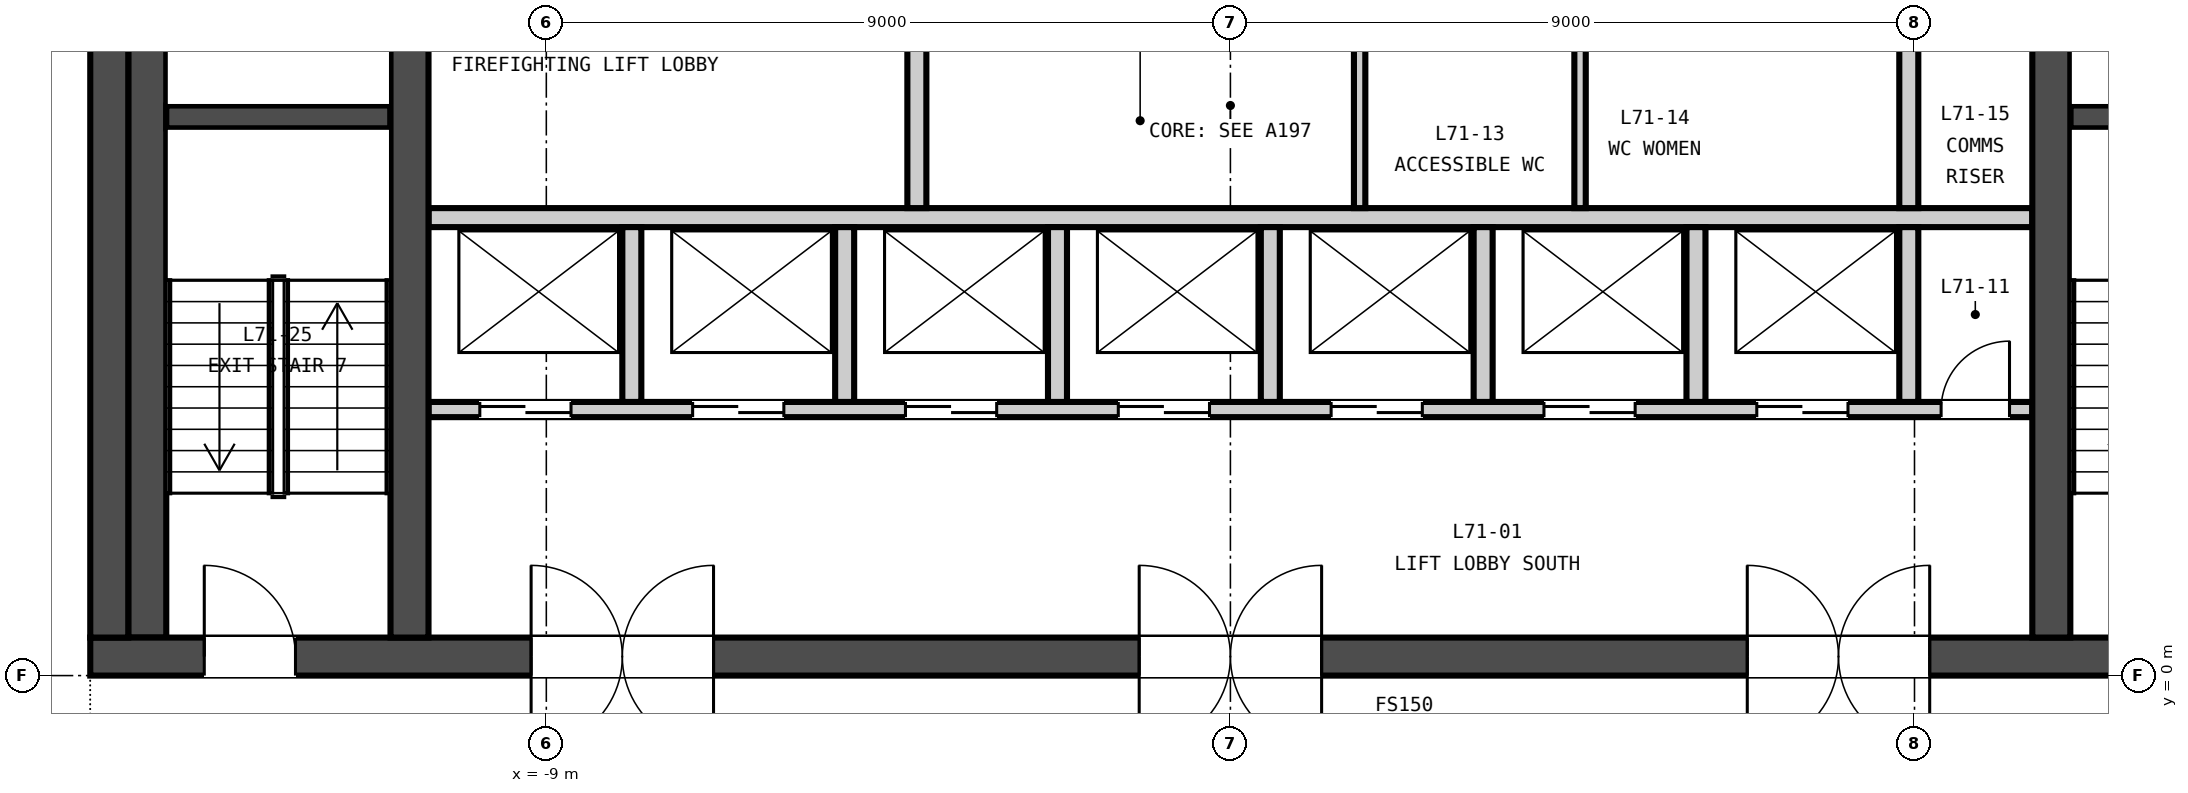
"""IFC4 building model, lengths in metres.
Left out: names, types, materials, properties, quantities, classifications, styles, units other than length and angle.
Written with IfcOpenShell. Run it as: python <this file> out.ifc"""

import sys

from ifc_helpers import new_model, si_unit, direction, frame, frame_2d, origin, place, context, subcontext, project, spatial, rectangle, extrude, element, fill, save


model = new_model("IFC4")
c1 = context("Model", 3, precision=1e-05, world=origin(), true_north=direction((0.0, 1.0)))
c2 = subcontext(c1, "Body", "Model", "MODEL_VIEW")
j1 = project(units=[si_unit("LENGTHUNIT", "METRE"), si_unit("PLANEANGLEUNIT", "RADIAN")], contexts=[c1])
p1 = place(None, origin())
s1 = spatial("IfcSite", under=j1, at=p1, CompositionType="ELEMENT")
p2 = place(p1, origin())
s2 = spatial("IfcBuilding", under=s1, at=p2, CompositionType="ELEMENT")
p3 = place(p2, frame((0.0, 0.0, 279.2)))
s3 = spatial("IfcBuildingStorey", under=s2, at=p3, CompositionType="ELEMENT", Elevation=279.2)
p4 = place(p3, frame((-15.0, 0.25, -0.15), z_axis=(0.0, 0.0, 1.0), x_axis=(1.0, 0.0, 0.0)))
e1 = element("IfcWall", 1, at=p4, inside=s3, PredefinedType="SOLIDWALL", context=c2, shape_type="SweptSolid", body=[
    extrude(rectangle(XDim=30.0, YDim=0.5, at=frame_2d((15.0, 0.0))), origin(), (0.0, 0.0, 1.0), 3.65),
])
p5 = place(p4, frame((5.8, 0.0, 0.15)))
e2 = element("IfcOpeningElement", 2, at=p5, cuts=e1, PredefinedType="OPENING", context=c2, shape_type="SweptSolid", body=[
    extrude(rectangle(XDim=2.4, YDim=2.4, at=frame_2d((1.2, 1.2))), frame((0.0, 0.26, 0.0), z_axis=(0.0, -1.0, 0.0), x_axis=(1.0, 0.0, 0.0)), (0.0, 0.0, 1.0), 0.52),
])
p6 = place(p4, frame((13.8, 0.0, 0.15)))
e3 = element("IfcOpeningElement", 3, at=p6, cuts=e1, PredefinedType="OPENING", context=c2, shape_type="SweptSolid", body=[
    extrude(rectangle(XDim=2.4, YDim=2.4, at=frame_2d((1.2, 1.2))), frame((0.0, 0.26, 0.0), z_axis=(0.0, -1.0, 0.0), x_axis=(1.0, 0.0, 0.0)), (0.0, 0.0, 1.0), 0.52),
])
p7 = place(p4, frame((21.8, 0.0, 0.15)))
e4 = element("IfcOpeningElement", 4, at=p7, cuts=e1, PredefinedType="OPENING", context=c2, shape_type="SweptSolid", body=[
    extrude(rectangle(XDim=2.4, YDim=2.4, at=frame_2d((1.2, 1.2))), frame((0.0, 0.26, 0.0), z_axis=(0.0, -1.0, 0.0), x_axis=(1.0, 0.0, 0.0)), (0.0, 0.0, 1.0), 0.52),
])
p8 = place(p4, frame((1.5, 0.0, 0.15)))
e5 = element("IfcOpeningElement", 5, at=p8, cuts=e1, PredefinedType="OPENING", context=c2, shape_type="SweptSolid", body=[
    extrude(rectangle(XDim=1.2, YDim=2.1, at=frame_2d((0.6, 1.05))), frame((0.0, 0.26, 0.0), z_axis=(0.0, -1.0, 0.0), x_axis=(1.0, 0.0, 0.0)), (0.0, 0.0, 1.0), 0.52),
])
p9 = place(p4, frame((27.3, 0.0, 0.15)))
e6 = element("IfcOpeningElement", 6, at=p9, cuts=e1, PredefinedType="OPENING", context=c2, shape_type="SweptSolid", body=[
    extrude(rectangle(XDim=1.2, YDim=2.1, at=frame_2d((0.6, 1.05))), frame((0.0, 0.26, 0.0), z_axis=(0.0, -1.0, 0.0), x_axis=(1.0, 0.0, 0.0)), (0.0, 0.0, 1.0), 0.52),
])
for number, where, z_axis, x_axis in (
    (7, (-14.75, 0.5, -0.15), (0.0, 0.0, 1.0), (0.0, 1.0, 0.0)),
    (8, (-10.8, 0.5, -0.15), (0.0, 0.0, 1.0), (0.0, 1.0, 0.0)),
    (9, (10.8, 0.5, -0.15), (0.0, 0.0, 1.0), (0.0, 1.0, 0.0)),
):
    element("IfcWall", number, at=place(p3, frame(where, z_axis=z_axis, x_axis=x_axis)), inside=s3, PredefinedType="SOLIDWALL", context=c2, shape_type="SweptSolid", body=[
        extrude(rectangle(XDim=14.0, YDim=0.5, at=frame_2d((7.0, 0.0))), origin(), (0.0, 0.0, 1.0), 3.65),
    ])
p10 = place(p3, frame((-10.55, 3.5, 0.0), z_axis=(0.0, 0.0, 1.0), x_axis=(1.0, 0.0, 0.0)))
e10 = element("IfcWall", 10, at=p10, inside=s3, PredefinedType="PARTITIONING", context=c2, shape_type="SweptSolid", body=[
    extrude(rectangle(XDim=21.1, YDim=0.2, at=frame_2d((10.55, 0.0))), origin(), (0.0, 0.0, 1.0), 3.5),
])
p11 = place(p10, frame((0.675, 0.0, 0.0)))
e11 = element("IfcOpeningElement", 11, at=p11, cuts=e10, PredefinedType="OPENING", context=c2, shape_type="SweptSolid", body=[
    extrude(rectangle(XDim=1.2, YDim=2.1, at=frame_2d((0.6, 1.05))), frame((0.0, 0.11, 0.0), z_axis=(0.0, -1.0, 0.0), x_axis=(1.0, 0.0, 0.0)), (0.0, 0.0, 1.0), 0.22),
])
p12 = place(p10, frame((3.475, 0.0, 0.0)))
e12 = element("IfcOpeningElement", 12, at=p12, cuts=e10, PredefinedType="OPENING", context=c2, shape_type="SweptSolid", body=[
    extrude(rectangle(XDim=1.2, YDim=2.1, at=frame_2d((0.6, 1.05))), frame((0.0, 0.11, 0.0), z_axis=(0.0, -1.0, 0.0), x_axis=(1.0, 0.0, 0.0)), (0.0, 0.0, 1.0), 0.22),
])
p13 = place(p10, frame((6.275, 0.0, 0.0)))
e13 = element("IfcOpeningElement", 13, at=p13, cuts=e10, PredefinedType="OPENING", context=c2, shape_type="SweptSolid", body=[
    extrude(rectangle(XDim=1.2, YDim=2.1, at=frame_2d((0.6, 1.05))), frame((0.0, 0.11, 0.0), z_axis=(0.0, -1.0, 0.0), x_axis=(1.0, 0.0, 0.0)), (0.0, 0.0, 1.0), 0.22),
])
p14 = place(p10, frame((9.075, 0.0, 0.0)))
e14 = element("IfcOpeningElement", 14, at=p14, cuts=e10, PredefinedType="OPENING", context=c2, shape_type="SweptSolid", body=[
    extrude(rectangle(XDim=1.2, YDim=2.1, at=frame_2d((0.6, 1.05))), frame((0.0, 0.11, 0.0), z_axis=(0.0, -1.0, 0.0), x_axis=(1.0, 0.0, 0.0)), (0.0, 0.0, 1.0), 0.22),
])
p15 = place(p10, frame((11.875, 0.0, 0.0)))
e15 = element("IfcOpeningElement", 15, at=p15, cuts=e10, PredefinedType="OPENING", context=c2, shape_type="SweptSolid", body=[
    extrude(rectangle(XDim=1.2, YDim=2.1, at=frame_2d((0.6, 1.05))), frame((0.0, 0.11, 0.0), z_axis=(0.0, -1.0, 0.0), x_axis=(1.0, 0.0, 0.0)), (0.0, 0.0, 1.0), 0.22),
])
p16 = place(p10, frame((14.675, 0.0, 0.0)))
e16 = element("IfcOpeningElement", 16, at=p16, cuts=e10, PredefinedType="OPENING", context=c2, shape_type="SweptSolid", body=[
    extrude(rectangle(XDim=1.2, YDim=2.1, at=frame_2d((0.6, 1.05))), frame((0.0, 0.11, 0.0), z_axis=(0.0, -1.0, 0.0), x_axis=(1.0, 0.0, 0.0)), (0.0, 0.0, 1.0), 0.22),
])
p17 = place(p10, frame((17.475, 0.0, 0.0)))
e17 = element("IfcOpeningElement", 17, at=p17, cuts=e10, PredefinedType="OPENING", context=c2, shape_type="SweptSolid", body=[
    extrude(rectangle(XDim=1.2, YDim=2.1, at=frame_2d((0.6, 1.05))), frame((0.0, 0.11, 0.0), z_axis=(0.0, -1.0, 0.0), x_axis=(1.0, 0.0, 0.0)), (0.0, 0.0, 1.0), 0.22),
])
p18 = place(p10, frame((19.9, 0.0, 0.0)))
e18 = element("IfcOpeningElement", 18, at=p18, cuts=e10, PredefinedType="OPENING", context=c2, shape_type="SweptSolid", body=[
    extrude(rectangle(XDim=0.9, YDim=2.1, at=frame_2d((0.45, 1.05))), frame((0.0, 0.11, 0.0), z_axis=(0.0, -1.0, 0.0), x_axis=(1.0, 0.0, 0.0)), (0.0, 0.0, 1.0), 0.22),
])
p19 = place(p3, frame((-10.55, 6.025, 0.0), z_axis=(0.0, 0.0, 1.0), x_axis=(1.0, 0.0, 0.0)))
e19 = element("IfcWall", 19, at=p19, inside=s3, PredefinedType="PARTITIONING", context=c2, shape_type="SweptSolid", body=[
    extrude(rectangle(XDim=21.1, YDim=0.25, at=frame_2d((10.55, 0.0))), origin(), (0.0, 0.0, 1.0), 3.5),
])
p20 = place(p3, frame((-4.125, 6.15, 0.0), z_axis=(0.0, 0.0, 1.0), x_axis=(0.0, 1.0, 0.0)))
e20 = element("IfcWall", 20, at=p20, inside=s3, PredefinedType="PARTITIONING", context=c2, shape_type="SweptSolid", body=[
    extrude(rectangle(XDim=4.95, YDim=0.25, at=frame_2d((2.475, 0.0))), origin(), (0.0, 0.0, 1.0), 3.5),
])
p21 = place(p20, frame((3.125, 0.0, 0.0)))
e21 = element("IfcOpeningElement", 21, at=p21, cuts=e20, PredefinedType="OPENING", context=c2, shape_type="SweptSolid", body=[
    extrude(rectangle(XDim=1.2, YDim=2.1, at=frame_2d((0.6, 1.05))), frame((0.0, 0.135, 0.0), z_axis=(0.0, -1.0, 0.0), x_axis=(1.0, 0.0, 0.0)), (0.0, 0.0, 1.0), 0.27),
])
for number, where, z_axis, x_axis in (
    (22, (-7.875, 3.6, 0.0), (0.0, 0.0, 1.0), (0.0, 1.0, 0.0)),
    (23, (-5.075, 3.6, 0.0), (0.0, 0.0, 1.0), (0.0, 1.0, 0.0)),
    (24, (-2.275, 3.6, 0.0), (0.0, 0.0, 1.0), (0.0, 1.0, 0.0)),
    (25, (0.525, 3.6, 0.0), (0.0, 0.0, 1.0), (0.0, 1.0, 0.0)),
    (26, (3.325, 3.6, 0.0), (0.0, 0.0, 1.0), (0.0, 1.0, 0.0)),
    (27, (6.125, 3.6, 0.0), (0.0, 0.0, 1.0), (0.0, 1.0, 0.0)),
    (28, (8.925, 3.6, 0.0), (0.0, 0.0, 1.0), (0.0, 1.0, 0.0)),
):
    element("IfcWall", number, at=place(p3, frame(where, z_axis=z_axis, x_axis=x_axis)), inside=s3, PredefinedType="PARTITIONING", context=c2, shape_type="SweptSolid", body=[
        extrude(rectangle(XDim=2.3, YDim=0.25, at=frame_2d((1.15, 0.0))), origin(), (0.0, 0.0, 1.0), 3.5),
    ])
for number, where, z_axis, x_axis in (
    (29, (1.7, 6.15, 0.0), (0.0, 0.0, 1.0), (0.0, 1.0, 0.0)),
    (30, (4.6, 6.15, 0.0), (0.0, 0.0, 1.0), (0.0, 1.0, 0.0)),
):
    element("IfcWall", number, at=place(p3, frame(where, z_axis=z_axis, x_axis=x_axis)), inside=s3, PredefinedType="PARTITIONING", context=c2, shape_type="SweptSolid", body=[
        extrude(rectangle(XDim=2.3, YDim=0.15, at=frame_2d((1.15, 0.0))), origin(), (0.0, 0.0, 1.0), 3.5),
    ])
p22 = place(p3, frame((8.925, 6.15, 0.0), z_axis=(0.0, 0.0, 1.0), x_axis=(0.0, 1.0, 0.0)))
e31 = element("IfcWall", 31, at=p22, inside=s3, PredefinedType="PARTITIONING", context=c2, shape_type="SweptSolid", body=[
    extrude(rectangle(XDim=2.3, YDim=0.25, at=frame_2d((1.15, 0.0))), origin(), (0.0, 0.0, 1.0), 3.5),
])
p23 = place(p3, frame((-14.0, 7.35, 0.0), z_axis=(0.0, 0.0, 1.0), x_axis=(1.0, 0.0, 0.0)))
e32 = element("IfcWall", 32, at=p23, inside=s3, PredefinedType="SOLIDWALL", context=c2, shape_type="SweptSolid", body=[
    extrude(rectangle(XDim=2.95, YDim=0.3, at=frame_2d((1.475, 0.0))), origin(), (0.0, 0.0, 1.0), 3.5),
])
p24 = place(p3, frame((-14.25, 0.5, 0.0), z_axis=(0.0, 0.0, 1.0), x_axis=(0.0, 1.0, 0.0)))
e33 = element("IfcWall", 33, at=p24, inside=s3, PredefinedType="SOLIDWALL", context=c2, shape_type="SweptSolid", body=[
    extrude(rectangle(XDim=14.0, YDim=0.5, at=frame_2d((7.0, 0.0))), origin(), (0.0, 0.0, 1.0), 3.5),
])
p25 = place(p3, frame((11.05, 7.35, 0.0), z_axis=(0.0, 0.0, 1.0), x_axis=(1.0, 0.0, 0.0)))
e34 = element("IfcWall", 34, at=p25, inside=s3, PredefinedType="SOLIDWALL", context=c2, shape_type="SweptSolid", body=[
    extrude(rectangle(XDim=2.95, YDim=0.3, at=frame_2d((1.475, 0.0))), origin(), (0.0, 0.0, 1.0), 3.5),
])
p26 = place(p11, origin())
e35 = element("IfcDoor", 35, at=p26, inside=s3, OperationType="DOUBLE_DOOR_SLIDING", PredefinedType="DOOR", context=c2, shape_type="SweptSolid", body=[
    extrude(rectangle(XDim=1.2, YDim=2.1, at=frame_2d((0.6, 1.05))), frame((0.0, 0.025, 0.0), z_axis=(0.0, -1.0, 0.0), x_axis=(1.0, 0.0, 0.0)), (0.0, 0.0, 1.0), 0.05),
])
fill(e11, e35)
p27 = place(p12, origin())
e36 = element("IfcDoor", 36, at=p27, inside=s3, OperationType="DOUBLE_DOOR_SLIDING", PredefinedType="DOOR", context=c2, shape_type="SweptSolid", body=[
    extrude(rectangle(XDim=1.2, YDim=2.1, at=frame_2d((0.6, 1.05))), frame((0.0, 0.025, 0.0), z_axis=(0.0, -1.0, 0.0), x_axis=(1.0, 0.0, 0.0)), (0.0, 0.0, 1.0), 0.05),
])
fill(e12, e36)
p28 = place(p13, origin())
e37 = element("IfcDoor", 37, at=p28, inside=s3, OperationType="DOUBLE_DOOR_SLIDING", PredefinedType="DOOR", context=c2, shape_type="SweptSolid", body=[
    extrude(rectangle(XDim=1.2, YDim=2.1, at=frame_2d((0.6, 1.05))), frame((0.0, 0.025, 0.0), z_axis=(0.0, -1.0, 0.0), x_axis=(1.0, 0.0, 0.0)), (0.0, 0.0, 1.0), 0.05),
])
fill(e13, e37)
p29 = place(p14, origin())
e38 = element("IfcDoor", 38, at=p29, inside=s3, OperationType="DOUBLE_DOOR_SLIDING", PredefinedType="DOOR", context=c2, shape_type="SweptSolid", body=[
    extrude(rectangle(XDim=1.2, YDim=2.1, at=frame_2d((0.6, 1.05))), frame((0.0, 0.025, 0.0), z_axis=(0.0, -1.0, 0.0), x_axis=(1.0, 0.0, 0.0)), (0.0, 0.0, 1.0), 0.05),
])
fill(e14, e38)
p30 = place(p15, origin())
e39 = element("IfcDoor", 39, at=p30, inside=s3, OperationType="DOUBLE_DOOR_SLIDING", PredefinedType="DOOR", context=c2, shape_type="SweptSolid", body=[
    extrude(rectangle(XDim=1.2, YDim=2.1, at=frame_2d((0.6, 1.05))), frame((0.0, 0.025, 0.0), z_axis=(0.0, -1.0, 0.0), x_axis=(1.0, 0.0, 0.0)), (0.0, 0.0, 1.0), 0.05),
])
fill(e15, e39)
p31 = place(p16, origin())
e40 = element("IfcDoor", 40, at=p31, inside=s3, OperationType="DOUBLE_DOOR_SLIDING", PredefinedType="DOOR", context=c2, shape_type="SweptSolid", body=[
    extrude(rectangle(XDim=1.2, YDim=2.1, at=frame_2d((0.6, 1.05))), frame((0.0, 0.025, 0.0), z_axis=(0.0, -1.0, 0.0), x_axis=(1.0, 0.0, 0.0)), (0.0, 0.0, 1.0), 0.05),
])
fill(e16, e40)
p32 = place(p17, origin())
e41 = element("IfcDoor", 41, at=p32, inside=s3, OperationType="DOUBLE_DOOR_SLIDING", PredefinedType="DOOR", context=c2, shape_type="SweptSolid", body=[
    extrude(rectangle(XDim=1.2, YDim=2.1, at=frame_2d((0.6, 1.05))), frame((0.0, 0.025, 0.0), z_axis=(0.0, -1.0, 0.0), x_axis=(1.0, 0.0, 0.0)), (0.0, 0.0, 1.0), 0.05),
])
fill(e17, e41)
p33 = place(p18, origin())
e42 = element("IfcDoor", 42, at=p33, inside=s3, OperationType="SINGLE_SWING_RIGHT", PredefinedType="DOOR", context=c2, shape_type="SweptSolid", body=[
    extrude(rectangle(XDim=0.9, YDim=2.1, at=frame_2d((0.45, 1.05))), frame((0.0, 0.025, 0.0), z_axis=(0.0, -1.0, 0.0), x_axis=(1.0, 0.0, 0.0)), (0.0, 0.0, 1.0), 0.05),
])
fill(e18, e42)
p34 = place(p5, origin())
e43 = element("IfcDoor", 43, at=p34, inside=s3, OperationType="DOUBLE_DOOR_DOUBLE_SWING", PredefinedType="DOOR", context=c2, shape_type="SweptSolid", body=[
    extrude(rectangle(XDim=2.4, YDim=2.4, at=frame_2d((1.2, 1.2))), frame((0.0, 0.025, 0.0), z_axis=(0.0, -1.0, 0.0), x_axis=(1.0, 0.0, 0.0)), (0.0, 0.0, 1.0), 0.05),
])
fill(e2, e43)
p35 = place(p6, origin())
e44 = element("IfcDoor", 44, at=p35, inside=s3, OperationType="DOUBLE_DOOR_DOUBLE_SWING", PredefinedType="DOOR", context=c2, shape_type="SweptSolid", body=[
    extrude(rectangle(XDim=2.4, YDim=2.4, at=frame_2d((1.2, 1.2))), frame((0.0, 0.025, 0.0), z_axis=(0.0, -1.0, 0.0), x_axis=(1.0, 0.0, 0.0)), (0.0, 0.0, 1.0), 0.05),
])
fill(e3, e44)
p36 = place(p7, origin())
e45 = element("IfcDoor", 45, at=p36, inside=s3, OperationType="DOUBLE_DOOR_DOUBLE_SWING", PredefinedType="DOOR", context=c2, shape_type="SweptSolid", body=[
    extrude(rectangle(XDim=2.4, YDim=2.4, at=frame_2d((1.2, 1.2))), frame((0.0, 0.025, 0.0), z_axis=(0.0, -1.0, 0.0), x_axis=(1.0, 0.0, 0.0)), (0.0, 0.0, 1.0), 0.05),
])
fill(e4, e45)
p37 = place(p8, origin())
e46 = element("IfcDoor", 46, at=p37, inside=s3, OperationType="SINGLE_SWING_LEFT", PredefinedType="DOOR", context=c2, shape_type="SweptSolid", body=[
    extrude(rectangle(XDim=1.2, YDim=2.1, at=frame_2d((0.6, 1.05))), frame((0.0, 0.025, 0.0), z_axis=(0.0, -1.0, 0.0), x_axis=(1.0, 0.0, 0.0)), (0.0, 0.0, 1.0), 0.05),
])
fill(e5, e46)
save(model, sys.argv[1])
